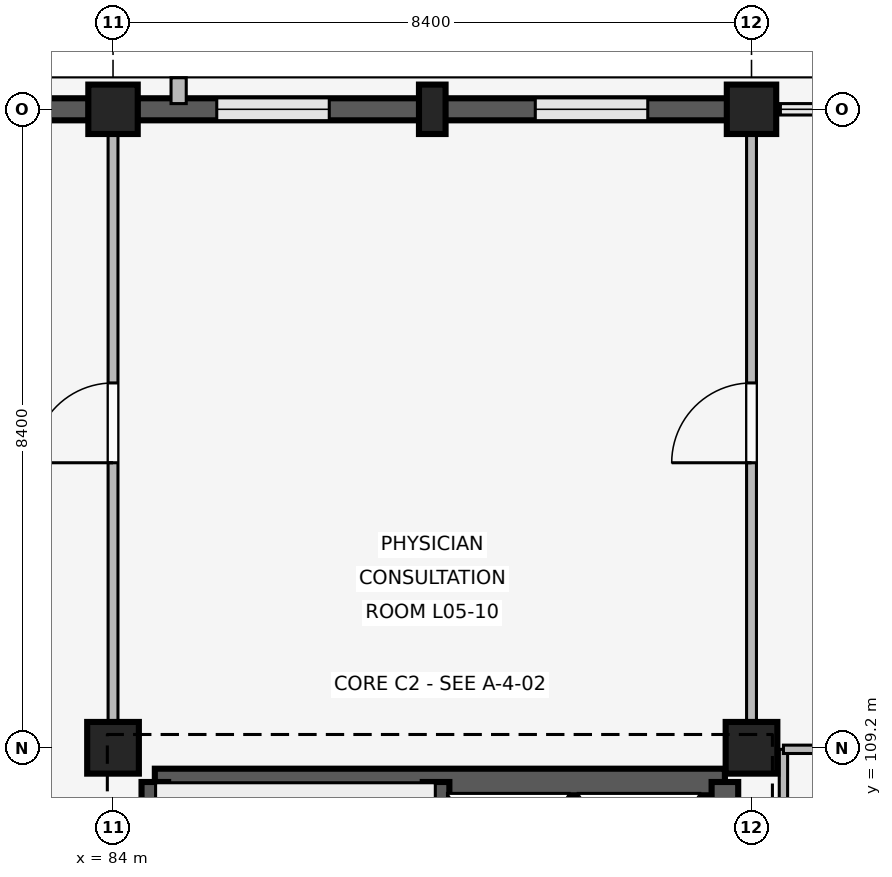
"""IFC4 building model, lengths in metres.
Left out: names, types, materials, properties, quantities, classifications, styles, units other than length and angle.
Written with IfcOpenShell. Run it as: python <this file> out.ifc"""

import sys

from ifc_helpers import new_model, si_unit, direction, frame, frame_2d, origin, origin_2d, place, context, subcontext, project, spatial, rectangle, extrude, element, fill, save


model = new_model("IFC4")
c1 = context("Model", 3, precision=1e-05, world=origin(), true_north=direction((0.0, 1.0)))
c2 = subcontext(c1, "Body", "Model", "MODEL_VIEW")
j1 = project(units=[si_unit("LENGTHUNIT", "METRE"), si_unit("PLANEANGLEUNIT", "RADIAN")], contexts=[c1])
p1 = place(None, origin())
s1 = spatial("IfcSite", under=j1, at=p1, CompositionType="ELEMENT")
p2 = place(p1, origin())
s2 = spatial("IfcBuilding", under=s1, at=p2, CompositionType="ELEMENT")
p3 = place(p2, frame((0.0, 0.0, 20.4)))
s3 = spatial("IfcBuildingStorey", under=s2, at=p3, CompositionType="ELEMENT", Elevation=20.4)
p4 = place(p3, frame((84.0, 109.2, 0.0), z_axis=(0.0, 0.0, 1.0), x_axis=(1.0, 0.0, 0.0)))
e1 = element("IfcColumn", 1, at=p4, inside=s3, PredefinedType="COLUMN", context=c2, shape_type="SweptSolid", body=[
    extrude(rectangle(XDim=0.68, YDim=0.68, at=origin_2d()), origin(), (0.0, 0.0, 1.0), 4.2),
])
p5 = place(p3, frame((84.0, 117.6, 0.0), z_axis=(0.0, 0.0, 1.0), x_axis=(1.0, 0.0, 0.0)))
e2 = element("IfcColumn", 2, at=p5, inside=s3, PredefinedType="COLUMN", context=c2, shape_type="SweptSolid", body=[
    extrude(rectangle(XDim=0.65, YDim=0.65, at=origin_2d()), origin(), (0.0, 0.0, 1.0), 4.2),
])
p6 = place(p3, frame((92.4, 109.2, 0.0), z_axis=(0.0, 0.0, 1.0), x_axis=(1.0, 0.0, 0.0)))
e3 = element("IfcColumn", 3, at=p6, inside=s3, PredefinedType="COLUMN", context=c2, shape_type="SweptSolid", body=[
    extrude(rectangle(XDim=0.68, YDim=0.68, at=origin_2d()), origin(), (0.0, 0.0, 1.0), 4.2),
])
p7 = place(p3, frame((92.4, 117.6, 0.0), z_axis=(0.0, 0.0, 1.0), x_axis=(1.0, 0.0, 0.0)))
e4 = element("IfcColumn", 4, at=p7, inside=s3, PredefinedType="COLUMN", context=c2, shape_type="SweptSolid", body=[
    extrude(rectangle(XDim=0.65, YDim=0.65, at=origin_2d()), origin(), (0.0, 0.0, 1.0), 4.2),
])
p8 = place(p3, frame((88.2, 117.6, 0.0), z_axis=(0.0, 0.0, 1.0), x_axis=(1.0, 0.0, 0.0)))
e5 = element("IfcColumn", 5, at=p8, inside=s3, PredefinedType="PILASTER", context=c2, shape_type="SweptSolid", body=[
    extrude(rectangle(XDim=0.35, YDim=0.65, at=origin_2d()), origin(), (0.0, 0.0, 1.0), 4.2),
])
p9 = place(p3, frame((75.92, 117.6, 0.0), z_axis=(0.0, 0.0, 1.0), x_axis=(1.0, 0.0, 0.0)))
e6 = element("IfcWall", 6, at=p9, inside=s3, PredefinedType="SOLIDWALL", context=c2, shape_type="SweptSolid", body=[
    extrude(rectangle(XDim=7.76, YDim=0.29, at=frame_2d((3.88, 0.0))), origin(), (0.0, 0.0, 1.0), 3.34),
])
p10 = place(p9, frame((0.995, 0.0, 0.85)))
e7 = element("IfcOpeningElement", 7, at=p10, cuts=e6, PredefinedType="OPENING", context=c2, shape_type="SweptSolid", body=[
    extrude(rectangle(XDim=1.58, YDim=1.7, at=frame_2d((0.79, 0.85))), frame((0.0, 0.155, 0.0), z_axis=(0.0, -1.0, 0.0), x_axis=(1.0, 0.0, 0.0)), (0.0, 0.0, 1.0), 0.31),
])
p11 = place(p9, frame((5.185, 0.0, 0.85)))
e8 = element("IfcOpeningElement", 8, at=p11, cuts=e6, PredefinedType="OPENING", context=c2, shape_type="SweptSolid", body=[
    extrude(rectangle(XDim=1.58, YDim=1.7, at=frame_2d((0.79, 0.85))), frame((0.0, 0.155, 0.0), z_axis=(0.0, -1.0, 0.0), x_axis=(1.0, 0.0, 0.0)), (0.0, 0.0, 1.0), 0.31),
])
p12 = place(p3, frame((84.32, 117.6, 0.0), z_axis=(0.0, 0.0, 1.0), x_axis=(1.0, 0.0, 0.0)))
e9 = element("IfcWall", 9, at=p12, inside=s3, PredefinedType="SOLIDWALL", context=c2, shape_type="SweptSolid", body=[
    extrude(rectangle(XDim=7.76, YDim=0.29, at=frame_2d((3.88, 0.0))), origin(), (0.0, 0.0, 1.0), 3.34),
])
p13 = place(p12, frame((1.045, 0.0, 0.85)))
e10 = element("IfcOpeningElement", 10, at=p13, cuts=e9, PredefinedType="OPENING", context=c2, shape_type="SweptSolid", body=[
    extrude(rectangle(XDim=1.48, YDim=1.6, at=frame_2d((0.74, 0.8))), frame((0.0, 0.155, 0.0), z_axis=(0.0, -1.0, 0.0), x_axis=(1.0, 0.0, 0.0)), (0.0, 0.0, 1.0), 0.31),
])
p14 = place(p12, frame((5.235, 0.0, 0.85)))
e11 = element("IfcOpeningElement", 11, at=p14, cuts=e9, PredefinedType="OPENING", context=c2, shape_type="SweptSolid", body=[
    extrude(rectangle(XDim=1.48, YDim=1.6, at=frame_2d((0.74, 0.8))), frame((0.0, 0.155, 0.0), z_axis=(0.0, -1.0, 0.0), x_axis=(1.0, 0.0, 0.0)), (0.0, 0.0, 1.0), 0.31),
])
p15 = place(p3, frame((84.863, 117.675, 0.0), z_axis=(0.0, 0.0, 1.0), x_axis=(0.0, 1.0, 0.0)))
e12 = element("IfcWall", 12, at=p15, inside=s3, PredefinedType="ELEMENTEDWALL", context=c2, shape_type="SweptSolid", body=[
    extrude(rectangle(XDim=0.34, YDim=0.2, at=frame_2d((0.17, 0.0))), origin(), (0.0, 0.0, 1.0), 3.32),
])
p16 = place(p3, frame((84.55, 108.75, 0.0), z_axis=(0.0, 0.0, 1.0), x_axis=(1.0, 0.0, 0.0)))
e13 = element("IfcWall", 13, at=p16, inside=s3, PredefinedType="SHEAR", context=c2, shape_type="SweptSolid", body=[
    extrude(rectangle(XDim=7.5, YDim=0.35, at=frame_2d((3.75, 0.0))), origin(), (0.0, 0.0, 1.0), 3.92),
])
p17 = place(p3, frame((84.55, 101.2, 0.0), z_axis=(0.0, 0.0, 1.0), x_axis=(0.0, 1.0, 0.0)))
e14 = element("IfcWall", 14, at=p17, inside=s3, PredefinedType="SHEAR", context=c2, shape_type="SweptSolid", body=[
    extrude(rectangle(XDim=7.55, YDim=0.35, at=frame_2d((3.775, 0.0))), origin(), (0.0, 0.0, 1.0), 3.92),
])
p18 = place(p17, frame((0.28, 0.0, 0.0)))
e15 = element("IfcOpeningElement", 15, at=p18, cuts=e14, PredefinedType="OPENING", context=c2, shape_type="SweptSolid", body=[
    extrude(rectangle(XDim=1.0, YDim=2.15, at=frame_2d((0.5, 1.075))), frame((0.0, 0.185, 0.0), z_axis=(0.0, -1.0, 0.0), x_axis=(1.0, 0.0, 0.0)), (0.0, 0.0, 1.0), 0.37),
])
p19 = place(p3, frame((92.05, 101.2, 0.0), z_axis=(0.0, 0.0, 1.0), x_axis=(0.0, 1.0, 0.0)))
e16 = element("IfcWall", 16, at=p19, inside=s3, PredefinedType="SHEAR", context=c2, shape_type="SweptSolid", body=[
    extrude(rectangle(XDim=7.55, YDim=0.35, at=frame_2d((3.775, 0.0))), origin(), (0.0, 0.0, 1.0), 3.92),
])
p20 = place(p19, frame((2.4, 0.0, 0.0)))
e17 = element("IfcOpeningElement", 17, at=p20, cuts=e16, PredefinedType="OPENING", context=c2, shape_type="SweptSolid", body=[
    extrude(rectangle(XDim=1.2, YDim=2.2, at=frame_2d((0.6, 1.1))), frame((0.0, 0.185, 0.0), z_axis=(0.0, -1.0, 0.0), x_axis=(1.0, 0.0, 0.0)), (0.0, 0.0, 1.0), 0.37),
])
p21 = place(p3, frame((88.25, 101.2, 0.0), z_axis=(0.0, 0.0, 1.0), x_axis=(0.0, 1.0, 0.0)))
e18 = element("IfcWall", 18, at=p21, inside=s3, PredefinedType="SHEAR", context=c2, shape_type="SweptSolid", body=[
    extrude(rectangle(XDim=7.55, YDim=0.35, at=frame_2d((3.775, 0.0))), origin(), (0.0, 0.0, 1.0), 3.92),
])
p22 = place(p21, frame((0.28, 0.0, 0.0)))
e19 = element("IfcOpeningElement", 19, at=p22, cuts=e18, PredefinedType="OPENING", context=c2, shape_type="SweptSolid", body=[
    extrude(rectangle(XDim=1.0, YDim=2.15, at=frame_2d((0.5, 1.075))), frame((0.0, 0.185, 0.0), z_axis=(0.0, -1.0, 0.0), x_axis=(1.0, 0.0, 0.0)), (0.0, 0.0, 1.0), 0.37),
])
p23 = place(p3, frame((84.0, 109.55, 0.0), z_axis=(0.0, 0.0, 1.0), x_axis=(0.0, 1.0, 0.0)))
e20 = element("IfcWall", 20, at=p23, inside=s3, PredefinedType="PARTITIONING", context=c2, shape_type="SweptSolid", body=[
    extrude(rectangle(XDim=7.91, YDim=0.13, at=frame_2d((3.955, 0.0))), origin(), (0.0, 0.0, 1.0), 3.32),
])
p24 = place(p23, frame((3.4, 0.0, 0.0)))
e21 = element("IfcOpeningElement", 21, at=p24, cuts=e20, PredefinedType="OPENING", context=c2, shape_type="SweptSolid", body=[
    extrude(rectangle(XDim=1.05, YDim=2.2, at=frame_2d((0.525, 1.1))), frame((0.0, 0.075, 0.0), z_axis=(0.0, -1.0, 0.0), x_axis=(1.0, 0.0, 0.0)), (0.0, 0.0, 1.0), 0.15),
])
p25 = place(p3, frame((92.4, 109.55, 0.0), z_axis=(0.0, 0.0, 1.0), x_axis=(0.0, 1.0, 0.0)))
e22 = element("IfcWall", 22, at=p25, inside=s3, PredefinedType="PARTITIONING", context=c2, shape_type="SweptSolid", body=[
    extrude(rectangle(XDim=7.91, YDim=0.13, at=frame_2d((3.955, 0.0))), origin(), (0.0, 0.0, 1.0), 3.32),
])
p26 = place(p25, frame((3.4, 0.0, 0.0)))
e23 = element("IfcOpeningElement", 23, at=p26, cuts=e22, PredefinedType="OPENING", context=c2, shape_type="SweptSolid", body=[
    extrude(rectangle(XDim=1.05, YDim=2.2, at=frame_2d((0.525, 1.1))), frame((0.0, 0.075, 0.0), z_axis=(0.0, -1.0, 0.0), x_axis=(1.0, 0.0, 0.0)), (0.0, 0.0, 1.0), 0.15),
])
p27 = place(p3, frame((92.82, 106.57, 0.0), z_axis=(0.0, 0.0, 1.0), x_axis=(0.0, 1.0, 0.0)))
e24 = element("IfcWall", 24, at=p27, inside=s3, PredefinedType="PARTITIONING", context=c2, shape_type="SweptSolid", body=[
    extrude(rectangle(XDim=2.61, YDim=0.11, at=frame_2d((1.305, 0.0))), origin(), (0.0, 0.0, 1.0), 3.32),
])
p28 = place(p3, frame((92.82, 109.18, 0.0), z_axis=(0.0, 0.0, 1.0), x_axis=(1.0, 0.0, 0.0)))
e25 = element("IfcWall", 25, at=p28, inside=s3, PredefinedType="PARTITIONING", context=c2, shape_type="SweptSolid", body=[
    extrude(rectangle(XDim=1.98, YDim=0.11, at=frame_2d((0.99, 0.0))), origin(), (0.0, 0.0, 1.0), 3.32),
])
p29 = place(p28, frame((0.54, 0.0, 0.0)))
e26 = element("IfcOpeningElement", 26, at=p29, cuts=e25, PredefinedType="OPENING", context=c2, shape_type="SweptSolid", body=[
    extrude(rectangle(XDim=0.9, YDim=2.1, at=frame_2d((0.45, 1.05))), frame((0.0, 0.065, 0.0), z_axis=(0.0, -1.0, 0.0), x_axis=(1.0, 0.0, 0.0)), (0.0, 0.0, 1.0), 0.13),
])
p30 = place(p13, origin())
e27 = element("IfcWindow", 27, at=p30, inside=s3, PartitioningType="SINGLE_PANEL", PredefinedType="WINDOW", context=c2, shape_type="SweptSolid", body=[
    extrude(rectangle(XDim=1.48, YDim=1.6, at=frame_2d((0.74, 0.8))), frame((0.0, 0.03, 0.0), z_axis=(0.0, -1.0, 0.0), x_axis=(1.0, 0.0, 0.0)), (0.0, 0.0, 1.0), 0.06),
])
fill(e10, e27)
p31 = place(p14, origin())
e28 = element("IfcWindow", 28, at=p31, inside=s3, PartitioningType="SINGLE_PANEL", PredefinedType="WINDOW", context=c2, shape_type="SweptSolid", body=[
    extrude(rectangle(XDim=1.48, YDim=1.6, at=frame_2d((0.74, 0.8))), frame((0.0, 0.03, 0.0), z_axis=(0.0, -1.0, 0.0), x_axis=(1.0, 0.0, 0.0)), (0.0, 0.0, 1.0), 0.06),
])
fill(e11, e28)
p32 = place(p24, origin())
e29 = element("IfcDoor", 29, at=p32, inside=s3, OperationType="SINGLE_SWING_LEFT", PredefinedType="DOOR", context=c2, shape_type="SweptSolid", body=[
    extrude(rectangle(XDim=1.05, YDim=2.2, at=frame_2d((0.525, 1.1))), frame((0.0, 0.025, 0.0), z_axis=(0.0, -1.0, 0.0), x_axis=(1.0, 0.0, 0.0)), (0.0, 0.0, 1.0), 0.05),
])
fill(e21, e29)
p33 = place(p26, origin())
e30 = element("IfcDoor", 30, at=p33, inside=s3, OperationType="SINGLE_SWING_LEFT", PredefinedType="DOOR", context=c2, shape_type="SweptSolid", body=[
    extrude(rectangle(XDim=1.05, YDim=2.2, at=frame_2d((0.525, 1.1))), frame((0.0, 0.025, 0.0), z_axis=(0.0, -1.0, 0.0), x_axis=(1.0, 0.0, 0.0)), (0.0, 0.0, 1.0), 0.05),
])
fill(e23, e30)
save(model, sys.argv[1])
